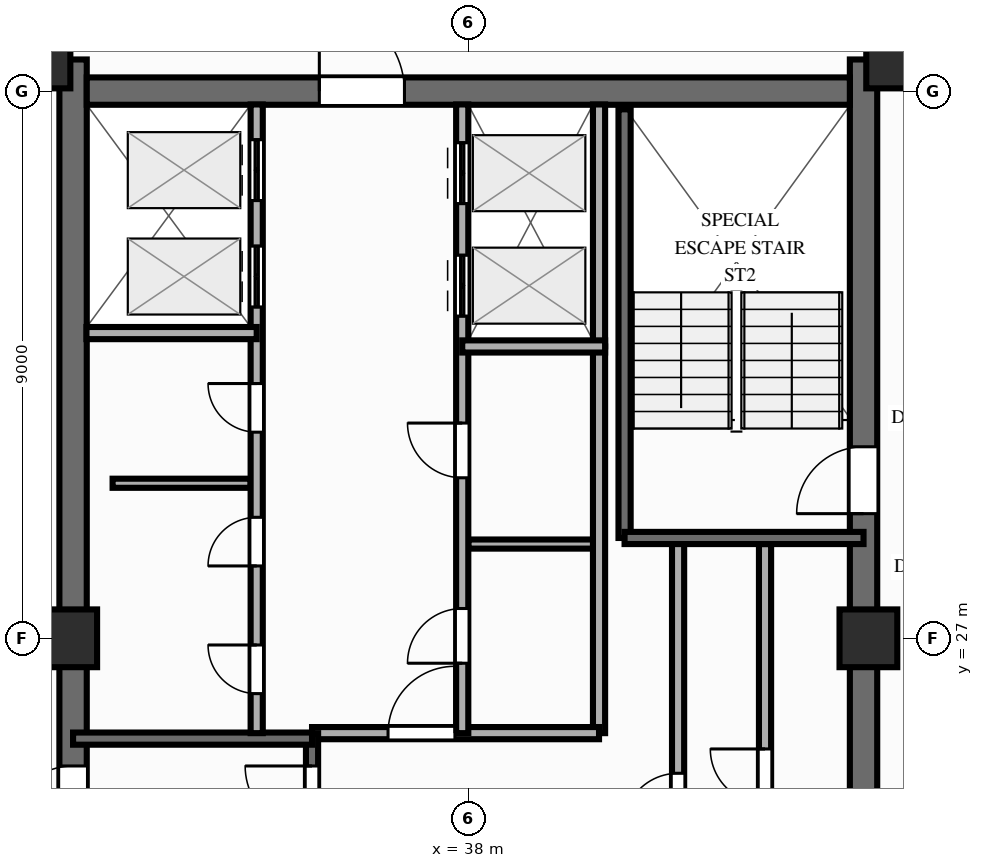
"""IFC4 building model, lengths in metres.
Left out: names, types, materials, properties, quantities, classifications, styles, units other than length and angle.
Written with IfcOpenShell. Run it as: python <this file> out.ifc"""

import sys

from ifc_helpers import new_model, si_unit, direction, frame, frame_2d, origin, origin_2d, place, context, subcontext, project, spatial, rectangle, extrude, source, transform, mapped, element, fill, save


model = new_model("IFC4")
c1 = context("Model", 3, precision=1e-05, world=origin(), true_north=direction((0.0, 1.0)))
c2 = subcontext(c1, "Body", "Model", "MODEL_VIEW")
j1 = project(units=[si_unit("LENGTHUNIT", "METRE"), si_unit("PLANEANGLEUNIT", "RADIAN")], contexts=[c1])
p1 = place(None, origin())
s1 = spatial("IfcSite", under=j1, at=p1, CompositionType="ELEMENT")
p2 = place(p1, origin())
s2 = spatial("IfcBuilding", under=s1, at=p2, CompositionType="ELEMENT")
p3 = place(p2, frame((0.0, 0.0, 240.0)))
s3 = spatial("IfcBuildingStorey", under=s2, at=p3, CompositionType="ELEMENT", Elevation=240.0)
p4 = place(p3, frame((31.5, 17.48, 0.0), z_axis=(0.0, 0.0, 1.0), x_axis=(0.0, 1.0, 0.0)))
e1 = element("IfcWall", 1, at=p4, inside=s3, PredefinedType="SHEAR", context=c2, shape_type="SweptSolid", body=[
    extrude(rectangle(XDim=19.04, YDim=0.45, at=frame_2d((9.52, 0.0))), origin(), (0.0, 0.0, 1.0), 3.0),
])
p5 = place(p4, frame((6.32, 0.0, 0.0)))
e2 = element("IfcOpeningElement", 2, at=p5, cuts=e1, PredefinedType="OPENING", context=c2, shape_type="SweptSolid", body=[
    extrude(rectangle(XDim=1.1, YDim=2.15, at=frame_2d((0.55, 1.075))), frame((0.0, 0.237, 0.0), z_axis=(0.0, -1.0, 0.0), x_axis=(1.0, 0.0, 0.0)), (0.0, 0.0, 1.0), 0.474),
])
p6 = place(p3, frame((44.5, 17.48, 0.0), z_axis=(0.0, 0.0, 1.0), x_axis=(0.0, 1.0, 0.0)))
e3 = element("IfcWall", 3, at=p6, inside=s3, PredefinedType="SHEAR", context=c2, shape_type="SweptSolid", body=[
    extrude(rectangle(XDim=19.04, YDim=0.45, at=frame_2d((9.52, 0.0))), origin(), (0.0, 0.0, 1.0), 3.0),
])
p7 = place(p6, frame((12.67, 0.0, 0.0), z_axis=(0.0, 0.0, 1.0), x_axis=(-1.0, 0.0, 0.0)))
e4 = element("IfcOpeningElement", 4, at=p7, cuts=e3, PredefinedType="OPENING", context=c2, shape_type="SweptSolid", body=[
    extrude(rectangle(XDim=1.1, YDim=2.15, at=frame_2d((0.55, 1.075))), frame((0.0, 0.237, 0.0), z_axis=(0.0, -1.0, 0.0), x_axis=(1.0, 0.0, 0.0)), (0.0, 0.0, 1.0), 0.474),
])
p8 = place(p3, frame((31.725, 36.0, 0.0), z_axis=(0.0, 0.0, 1.0), x_axis=(1.0, 0.0, 0.0)))
e5 = element("IfcWall", 5, at=p8, inside=s3, PredefinedType="SHEAR", context=c2, shape_type="SweptSolid", body=[
    extrude(rectangle(XDim=12.55, YDim=0.45, at=frame_2d((6.275, 0.0))), origin(), (0.0, 0.0, 1.0), 3.0),
])
p9 = place(p8, frame((5.225, 0.0, 0.0), z_axis=(0.0, 0.0, 1.0), x_axis=(-1.0, 0.0, 0.0)))
e6 = element("IfcOpeningElement", 6, at=p9, cuts=e5, PredefinedType="OPENING", context=c2, shape_type="SweptSolid", body=[
    extrude(rectangle(XDim=1.4, YDim=2.15, at=frame_2d((0.7, 1.075))), frame((0.0, 0.237, 0.0), z_axis=(0.0, -1.0, 0.0), x_axis=(1.0, 0.0, 0.0)), (0.0, 0.0, 1.0), 0.474),
])
m1 = source(origin(), c2, "Body", "SweptSolid", [
    extrude(rectangle(XDim=0.95, YDim=0.95, at=origin_2d()), origin(), (0.0, 0.0, 1.0), 3.0),
])
for number, where, z_axis, x_axis in (
    (7, (30.98, 36.52, 0.0), (0.0, 0.0, 1.0), (1.0, 0.0, 0.0)),
    (8, (45.02, 36.52, 0.0), (0.0, 0.0, 1.0), (1.0, 0.0, 0.0)),
    (9, (31.42, 27.0, 0.0), (0.0, 0.0, 1.0), (1.0, 0.0, 0.0)),
    (10, (44.58, 27.0, 0.0), (0.0, 0.0, 1.0), (1.0, 0.0, 0.0)),
):
    element("IfcColumn", number, at=place(p3, frame(where, z_axis=z_axis, x_axis=x_axis)), inside=s3, PredefinedType="COLUMN", context=c2, shape_type="MappedRepresentation", body=[
        mapped(m1, transform((0.0, 0.0, 0.0), scale=1.0)),
    ])
p10 = place(p3, frame((32.15, 29.55, 0.0), z_axis=(0.0, 0.0, 1.0), x_axis=(1.0, 0.0, 0.0)))
e11 = element("IfcWall", 11, at=p10, inside=s3, PredefinedType="PARTITIONING", context=c2, shape_type="SweptSolid", body=[
    extrude(rectangle(XDim=2.27, YDim=0.15, at=frame_2d((1.135, 0.0))), origin(), (0.0, 0.0, 1.0), 2.79),
])
p11 = place(p3, frame((38.0, 28.55, 0.0), z_axis=(0.0, 0.0, 1.0), x_axis=(1.0, 0.0, 0.0)))
e12 = element("IfcWall", 12, at=p11, inside=s3, PredefinedType="PARTITIONING", context=c2, shape_type="SweptSolid", body=[
    extrude(rectangle(XDim=2.2, YDim=0.15, at=frame_2d((1.1, 0.0))), origin(), (0.0, 0.0, 1.0), 2.14),
])
p12 = place(p3, frame((42.88, 21.08, 0.0), z_axis=(0.0, 0.0, 1.0), x_axis=(0.0, 1.0, 0.0)))
e13 = element("IfcWall", 13, at=p12, inside=s3, PredefinedType="PARTITIONING", context=c2, shape_type="SweptSolid", body=[
    extrude(rectangle(XDim=7.47, YDim=0.2, at=frame_2d((3.735, 0.0))), origin(), (0.0, 0.0, 1.0), 2.79),
])
p13 = place(p12, frame((3.2, 0.0, 0.0)))
e14 = element("IfcOpeningElement", 14, at=p13, cuts=e13, PredefinedType="OPENING", context=c2, shape_type="SweptSolid", body=[
    extrude(rectangle(XDim=0.9, YDim=2.1, at=frame_2d((0.45, 1.05))), frame((0.0, 0.112, 0.0), z_axis=(0.0, -1.0, 0.0), x_axis=(1.0, 0.0, 0.0)), (0.0, 0.0, 1.0), 0.224),
])
p14 = place(p3, frame((41.45, 21.08, 0.0), z_axis=(0.0, 0.0, 1.0), x_axis=(0.0, 1.0, 0.0)))
e15 = element("IfcWall", 15, at=p14, inside=s3, PredefinedType="PARTITIONING", context=c2, shape_type="SweptSolid", body=[
    extrude(rectangle(XDim=7.52, YDim=0.2, at=frame_2d((3.76, 0.0))), origin(), (0.0, 0.0, 1.0), 2.79),
])
p15 = place(p14, frame((2.8, 0.0, 0.0)))
e16 = element("IfcOpeningElement", 16, at=p15, cuts=e15, PredefinedType="OPENING", context=c2, shape_type="SweptSolid", body=[
    extrude(rectangle(XDim=0.9, YDim=2.1, at=frame_2d((0.45, 1.05))), frame((0.0, 0.112, 0.0), z_axis=(0.0, -1.0, 0.0), x_axis=(1.0, 0.0, 0.0)), (0.0, 0.0, 1.0), 0.224),
])
p16 = place(p3, frame((40.15, 25.44, 0.0), z_axis=(0.0, 0.0, 1.0), x_axis=(0.0, 1.0, 0.0)))
e17 = element("IfcWall", 17, at=p16, inside=s3, PredefinedType="PARTITIONING", context=c2, shape_type="SweptSolid", body=[
    extrude(rectangle(XDim=6.36, YDim=0.2, at=frame_2d((3.18, 0.0))), origin(), (0.0, 0.0, 1.0), 2.79),
])
p17 = place(p3, frame((40.15, 31.8, 0.0), z_axis=(0.0, 0.0, 1.0), x_axis=(0.0, 1.0, 0.0)))
e18 = element("IfcWall", 18, at=p17, inside=s3, PredefinedType="PARTITIONING", context=c2, shape_type="SweptSolid", body=[
    extrude(rectangle(XDim=3.98, YDim=0.2, at=frame_2d((1.99, 0.0))), origin(), (0.0, 0.0, 1.0), 2.79),
])
p18 = place(p3, frame((35.43, 25.44, 0.0), z_axis=(0.0, 0.0, 1.0), x_axis=(1.0, 0.0, 0.0)))
e19 = element("IfcWall", 19, at=p18, inside=s3, PredefinedType="PARTITIONING", context=c2, shape_type="SweptSolid", body=[
    extrude(rectangle(XDim=4.72, YDim=0.2, at=frame_2d((2.36, 0.0))), origin(), (0.0, 0.0, 1.0), 2.79),
])
p19 = place(p18, frame((1.25, 0.0, 0.0)))
e20 = element("IfcOpeningElement", 20, at=p19, cuts=e19, PredefinedType="OPENING", context=c2, shape_type="SweptSolid", body=[
    extrude(rectangle(XDim=1.1, YDim=2.15, at=frame_2d((0.55, 1.075))), frame((0.0, 0.112, 0.0), z_axis=(0.0, -1.0, 0.0), x_axis=(1.0, 0.0, 0.0)), (0.0, 0.0, 1.0), 0.224),
])
p20 = place(p3, frame((35.43, 18.22, 0.0), z_axis=(0.0, 0.0, 1.0), x_axis=(0.0, 1.0, 0.0)))
e21 = element("IfcWall", 21, at=p20, inside=s3, PredefinedType="SOLIDWALL", context=c2, shape_type="SweptSolid", body=[
    extrude(rectangle(XDim=7.22, YDim=0.2, at=frame_2d((3.61, 0.0))), origin(), (0.0, 0.0, 1.0), 2.79),
])
p21 = place(p20, frame((6.68, 0.0, 0.0), z_axis=(0.0, 0.0, 1.0), x_axis=(-1.0, 0.0, 0.0)))
e22 = element("IfcOpeningElement", 22, at=p21, cuts=e21, PredefinedType="OPENING", context=c2, shape_type="SweptSolid", body=[
    extrude(rectangle(XDim=1.1, YDim=2.15, at=frame_2d((0.55, 1.075))), frame((0.0, 0.112, 0.0), z_axis=(0.0, -1.0, 0.0), x_axis=(1.0, 0.0, 0.0)), (0.0, 0.0, 1.0), 0.224),
])
p22 = place(p3, frame((31.5, 25.35, 0.0), z_axis=(0.0, 0.0, 1.0), x_axis=(1.0, 0.0, 0.0)))
e23 = element("IfcWall", 23, at=p22, inside=s3, PredefinedType="SOLIDWALL", context=c2, shape_type="SweptSolid", body=[
    extrude(rectangle(XDim=3.93, YDim=0.2, at=frame_2d((1.965, 0.0))), origin(), (0.0, 0.0, 1.0), 2.79),
])
p23 = place(p3, frame((40.57, 28.65, 0.0), z_axis=(0.0, 0.0, 1.0), x_axis=(0.0, 1.0, 0.0)))
e24 = element("IfcWall", 24, at=p23, inside=s3, PredefinedType="SOLIDWALL", context=c2, shape_type="SweptSolid", body=[
    extrude(rectangle(XDim=7.05, YDim=0.2, at=frame_2d((3.525, 0.0))), origin(), (0.0, 0.0, 1.0), 2.79),
])
p24 = place(p3, frame((40.57, 28.65, 0.0), z_axis=(0.0, 0.0, 1.0), x_axis=(1.0, 0.0, 0.0)))
e25 = element("IfcWall", 25, at=p24, inside=s3, PredefinedType="SOLIDWALL", context=c2, shape_type="SweptSolid", body=[
    extrude(rectangle(XDim=3.93, YDim=0.2, at=frame_2d((1.965, 0.0))), origin(), (0.0, 0.0, 1.0), 2.79),
])
p25 = place(p3, frame((34.52, 25.44, 0.0), z_axis=(0.0, 0.0, 1.0), x_axis=(0.0, 1.0, 0.0)))
e26 = element("IfcWall", 26, at=p25, inside=s3, PredefinedType="PARTITIONING", context=c2, shape_type="SweptSolid", body=[
    extrude(rectangle(XDim=10.34, YDim=0.2, at=frame_2d((5.17, 0.0))), origin(), (0.0, 0.0, 1.0), 2.79),
])
p26 = place(p25, frame((0.65, 0.0, 0.0)))
e27 = element("IfcOpeningElement", 27, at=p26, cuts=e26, PredefinedType="OPENING", context=c2, shape_type="SweptSolid", body=[
    extrude(rectangle(XDim=0.8, YDim=2.05, at=frame_2d((0.4, 1.025))), frame((0.0, 0.112, 0.0), z_axis=(0.0, -1.0, 0.0), x_axis=(1.0, 0.0, 0.0)), (0.0, 0.0, 1.0), 0.224),
])
p27 = place(p25, frame((2.75, 0.0, 0.0)))
e28 = element("IfcOpeningElement", 28, at=p27, cuts=e26, PredefinedType="OPENING", context=c2, shape_type="SweptSolid", body=[
    extrude(rectangle(XDim=0.8, YDim=2.05, at=frame_2d((0.4, 1.025))), frame((0.0, 0.112, 0.0), z_axis=(0.0, -1.0, 0.0), x_axis=(1.0, 0.0, 0.0)), (0.0, 0.0, 1.0), 0.224),
])
p28 = place(p25, frame((4.95, 0.0, 0.0)))
e29 = element("IfcOpeningElement", 29, at=p28, cuts=e26, PredefinedType="OPENING", context=c2, shape_type="SweptSolid", body=[
    extrude(rectangle(XDim=0.8, YDim=2.05, at=frame_2d((0.4, 1.025))), frame((0.0, 0.112, 0.0), z_axis=(0.0, -1.0, 0.0), x_axis=(1.0, 0.0, 0.0)), (0.0, 0.0, 1.0), 0.224),
])
p29 = place(p25, frame((7.01, 0.0, 0.0)))
e30 = element("IfcOpeningElement", 30, at=p29, cuts=e26, PredefinedType="OPENING", context=c2, shape_type="SweptSolid", body=[
    extrude(rectangle(XDim=1.0, YDim=2.15, at=frame_2d((0.5, 1.075))), frame((0.0, 0.112, 0.0), z_axis=(0.0, -1.0, 0.0), x_axis=(1.0, 0.0, 0.0)), (0.0, 0.0, 1.0), 0.224),
])
p30 = place(p25, frame((8.76, 0.0, 0.0)))
e31 = element("IfcOpeningElement", 31, at=p30, cuts=e26, PredefinedType="OPENING", context=c2, shape_type="SweptSolid", body=[
    extrude(rectangle(XDim=1.0, YDim=2.15, at=frame_2d((0.5, 1.075))), frame((0.0, 0.112, 0.0), z_axis=(0.0, -1.0, 0.0), x_axis=(1.0, 0.0, 0.0)), (0.0, 0.0, 1.0), 0.224),
])
p31 = place(p3, frame((31.72, 32.02, 0.0), z_axis=(0.0, 0.0, 1.0), x_axis=(1.0, 0.0, 0.0)))
e32 = element("IfcWall", 32, at=p31, inside=s3, PredefinedType="PARTITIONING", context=c2, shape_type="SweptSolid", body=[
    extrude(rectangle(XDim=2.8, YDim=0.2, at=frame_2d((1.4, 0.0))), origin(), (0.0, 0.0, 1.0), 2.79),
])
p32 = place(p3, frame((37.9, 25.44, 0.0), z_axis=(0.0, 0.0, 1.0), x_axis=(0.0, 1.0, 0.0)))
e33 = element("IfcWall", 33, at=p32, inside=s3, PredefinedType="PARTITIONING", context=c2, shape_type="SweptSolid", body=[
    extrude(rectangle(XDim=10.34, YDim=0.2, at=frame_2d((5.17, 0.0))), origin(), (0.0, 0.0, 1.0), 2.79),
])
p33 = place(p32, frame((1.15, 0.0, 0.0)))
e34 = element("IfcOpeningElement", 34, at=p33, cuts=e33, PredefinedType="OPENING", context=c2, shape_type="SweptSolid", body=[
    extrude(rectangle(XDim=0.9, YDim=2.1, at=frame_2d((0.45, 1.05))), frame((0.0, 0.112, 0.0), z_axis=(0.0, -1.0, 0.0), x_axis=(1.0, 0.0, 0.0)), (0.0, 0.0, 1.0), 0.224),
])
p34 = place(p32, frame((4.2, 0.0, 0.0)))
e35 = element("IfcOpeningElement", 35, at=p34, cuts=e33, PredefinedType="OPENING", context=c2, shape_type="SweptSolid", body=[
    extrude(rectangle(XDim=0.9, YDim=2.1, at=frame_2d((0.45, 1.05))), frame((0.0, 0.112, 0.0), z_axis=(0.0, -1.0, 0.0), x_axis=(1.0, 0.0, 0.0)), (0.0, 0.0, 1.0), 0.224),
])
p35 = place(p32, frame((6.86, 0.0, 0.0)))
e36 = element("IfcOpeningElement", 36, at=p35, cuts=e33, PredefinedType="OPENING", context=c2, shape_type="SweptSolid", body=[
    extrude(rectangle(XDim=1.0, YDim=2.15, at=frame_2d((0.5, 1.075))), frame((0.0, 0.112, 0.0), z_axis=(0.0, -1.0, 0.0), x_axis=(1.0, 0.0, 0.0)), (0.0, 0.0, 1.0), 0.224),
])
p36 = place(p32, frame((8.71, 0.0, 0.0)))
e37 = element("IfcOpeningElement", 37, at=p36, cuts=e33, PredefinedType="OPENING", context=c2, shape_type="SweptSolid", body=[
    extrude(rectangle(XDim=1.0, YDim=2.15, at=frame_2d((0.5, 1.075))), frame((0.0, 0.112, 0.0), z_axis=(0.0, -1.0, 0.0), x_axis=(1.0, 0.0, 0.0)), (0.0, 0.0, 1.0), 0.224),
])
p37 = place(p3, frame((37.9, 31.8, 0.0), z_axis=(0.0, 0.0, 1.0), x_axis=(1.0, 0.0, 0.0)))
e38 = element("IfcWall", 38, at=p37, inside=s3, PredefinedType="PARTITIONING", context=c2, shape_type="SweptSolid", body=[
    extrude(rectangle(XDim=2.35, YDim=0.2, at=frame_2d((1.175, 0.0))), origin(), (0.0, 0.0, 1.0), 2.79),
])
m2 = source(origin(), c2, "Body", "SweptSolid", [
    extrude(rectangle(XDim=1.1, YDim=2.15, at=frame_2d((0.55, 1.075))), frame((0.0, 0.025, 0.0), z_axis=(0.0, -1.0, 0.0), x_axis=(1.0, 0.0, 0.0)), (0.0, 0.0, 1.0), 0.05),
])
p38 = place(p5, origin())
e39 = element("IfcDoor", 39, at=p38, inside=s3, OperationType="SINGLE_SWING_LEFT", PredefinedType="DOOR", context=c2, shape_type="MappedRepresentation", body=[
    mapped(m2, transform((0.0, 0.0, 0.0), scale=1.0)),
])
fill(e2, e39)
p39 = place(p7, origin())
e40 = element("IfcDoor", 40, at=p39, inside=s3, OperationType="SINGLE_SWING_RIGHT", PredefinedType="DOOR", context=c2, shape_type="MappedRepresentation", body=[
    mapped(m2, transform((0.0, 0.0, 0.0), scale=1.0)),
])
fill(e4, e40)
m3 = source(origin(), c2, "Body", "SweptSolid", [
    extrude(rectangle(XDim=1.4, YDim=2.15, at=frame_2d((0.7, 1.075))), frame((0.0, 0.025, 0.0), z_axis=(0.0, -1.0, 0.0), x_axis=(1.0, 0.0, 0.0)), (0.0, 0.0, 1.0), 0.05),
])
p40 = place(p9, origin())
e41 = element("IfcDoor", 41, at=p40, inside=s3, OperationType="SINGLE_SWING_RIGHT", PredefinedType="DOOR", context=c2, shape_type="MappedRepresentation", body=[
    mapped(m3, transform((0.0, 0.0, 0.0), scale=1.0)),
])
fill(e6, e41)
m4 = source(origin(), c2, "Body", "SweptSolid", [
    extrude(rectangle(XDim=0.9, YDim=2.1, at=frame_2d((0.45, 1.05))), frame((0.0, 0.025, 0.0), z_axis=(0.0, -1.0, 0.0), x_axis=(1.0, 0.0, 0.0)), (0.0, 0.0, 1.0), 0.05),
])
p41 = place(p13, origin())
e42 = element("IfcDoor", 42, at=p41, inside=s3, OperationType="SINGLE_SWING_RIGHT", PredefinedType="DOOR", context=c2, shape_type="MappedRepresentation", body=[
    mapped(m4, transform((0.0, 0.0, 0.0), scale=1.0)),
])
fill(e14, e42)
p42 = place(p15, origin())
e43 = element("IfcDoor", 43, at=p42, inside=s3, OperationType="SINGLE_SWING_LEFT", PredefinedType="DOOR", context=c2, shape_type="MappedRepresentation", body=[
    mapped(m4, transform((0.0, 0.0, 0.0), scale=1.0)),
])
fill(e16, e43)
p43 = place(p19, origin())
e44 = element("IfcDoor", 44, at=p43, inside=s3, OperationType="SINGLE_SWING_RIGHT", PredefinedType="DOOR", context=c2, shape_type="MappedRepresentation", body=[
    mapped(m2, transform((0.0, 0.0, 0.0), scale=1.0)),
])
fill(e20, e44)
p44 = place(p21, origin())
e45 = element("IfcDoor", 45, at=p44, inside=s3, OperationType="SINGLE_SWING_LEFT", PredefinedType="DOOR", context=c2, shape_type="MappedRepresentation", body=[
    mapped(m2, transform((0.0, 0.0, 0.0), scale=1.0)),
])
fill(e22, e45)
m5 = source(origin(), c2, "Body", "SweptSolid", [
    extrude(rectangle(XDim=0.8, YDim=2.05, at=frame_2d((0.4, 1.025))), frame((0.0, 0.025, 0.0), z_axis=(0.0, -1.0, 0.0), x_axis=(1.0, 0.0, 0.0)), (0.0, 0.0, 1.0), 0.05),
])
p45 = place(p26, origin())
e46 = element("IfcDoor", 46, at=p45, inside=s3, OperationType="SINGLE_SWING_RIGHT", PredefinedType="DOOR", context=c2, shape_type="MappedRepresentation", body=[
    mapped(m5, transform((0.0, 0.0, 0.0), scale=1.0)),
])
fill(e27, e46)
p46 = place(p27, origin())
e47 = element("IfcDoor", 47, at=p46, inside=s3, OperationType="SINGLE_SWING_LEFT", PredefinedType="DOOR", context=c2, shape_type="MappedRepresentation", body=[
    mapped(m5, transform((0.0, 0.0, 0.0), scale=1.0)),
])
fill(e28, e47)
p47 = place(p28, origin())
e48 = element("IfcDoor", 48, at=p47, inside=s3, OperationType="SINGLE_SWING_RIGHT", PredefinedType="DOOR", context=c2, shape_type="MappedRepresentation", body=[
    mapped(m5, transform((0.0, 0.0, 0.0), scale=1.0)),
])
fill(e29, e48)
m6 = source(origin(), c2, "Body", "SweptSolid", [
    extrude(rectangle(XDim=1.0, YDim=2.15, at=frame_2d((0.5, 1.075))), frame((0.0, 0.025, 0.0), z_axis=(0.0, -1.0, 0.0), x_axis=(1.0, 0.0, 0.0)), (0.0, 0.0, 1.0), 0.05),
])
p48 = place(p29, origin())
e49 = element("IfcDoor", 49, at=p48, inside=s3, OperationType="DOUBLE_DOOR_SLIDING", PredefinedType="DOOR", context=c2, shape_type="MappedRepresentation", body=[
    mapped(m6, transform((0.0, 0.0, 0.0), scale=1.0)),
])
fill(e30, e49)
p49 = place(p30, origin())
e50 = element("IfcDoor", 50, at=p49, inside=s3, OperationType="DOUBLE_DOOR_SLIDING", PredefinedType="DOOR", context=c2, shape_type="MappedRepresentation", body=[
    mapped(m6, transform((0.0, 0.0, 0.0), scale=1.0)),
])
fill(e31, e50)
p50 = place(p33, origin())
e51 = element("IfcDoor", 51, at=p50, inside=s3, OperationType="SINGLE_SWING_LEFT", PredefinedType="DOOR", context=c2, shape_type="MappedRepresentation", body=[
    mapped(m4, transform((0.0, 0.0, 0.0), scale=1.0)),
])
fill(e34, e51)
p51 = place(p34, origin())
e52 = element("IfcDoor", 52, at=p51, inside=s3, OperationType="SINGLE_SWING_RIGHT", PredefinedType="DOOR", context=c2, shape_type="MappedRepresentation", body=[
    mapped(m4, transform((0.0, 0.0, 0.0), scale=1.0)),
])
fill(e35, e52)
p52 = place(p35, origin())
e53 = element("IfcDoor", 53, at=p52, inside=s3, OperationType="DOUBLE_DOOR_SLIDING", PredefinedType="DOOR", context=c2, shape_type="MappedRepresentation", body=[
    mapped(m6, transform((0.0, 0.0, 0.0), scale=1.0)),
])
fill(e36, e53)
p53 = place(p36, origin())
e54 = element("IfcDoor", 54, at=p53, inside=s3, OperationType="DOUBLE_DOOR_SLIDING", PredefinedType="DOOR", context=c2, shape_type="MappedRepresentation", body=[
    mapped(m6, transform((0.0, 0.0, 0.0), scale=1.0)),
])
fill(e37, e54)
save(model, sys.argv[1])
